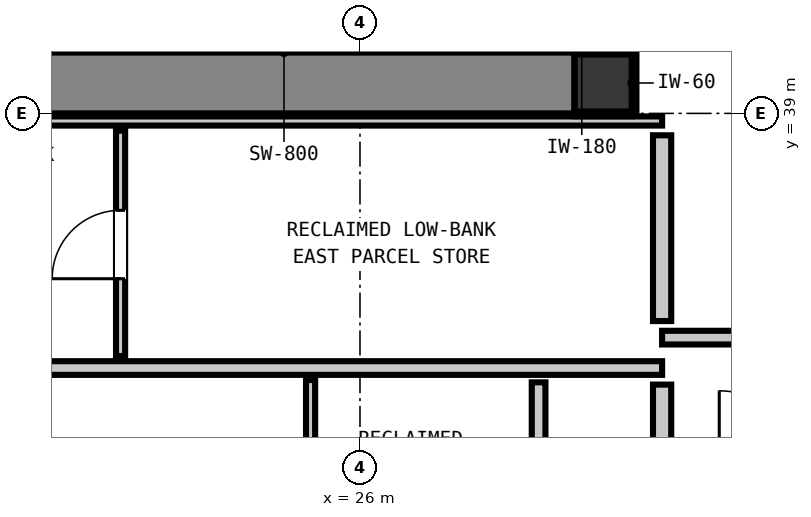
"""IFC4 building model, lengths in metres.
Left out: names, types, materials, properties, quantities, classifications, styles, units other than length and angle.
Written with IfcOpenShell. Run it as: python <this file> out.ifc"""

import sys

from ifc_helpers import new_model, si_unit, direction, frame, frame_2d, origin, origin_2d, place, context, subcontext, project, spatial, rectangle, extrude, element, fill, save


model = new_model("IFC4")
c1 = context("Model", 3, precision=1e-05, world=origin(), true_north=direction((0.0, 1.0)))
c2 = subcontext(c1, "Body", "Model", "MODEL_VIEW")
j1 = project(units=[si_unit("LENGTHUNIT", "METRE"), si_unit("PLANEANGLEUNIT", "RADIAN")], contexts=[c1])
p1 = place(None, origin())
s1 = spatial("IfcSite", under=j1, at=p1, CompositionType="ELEMENT")
p2 = place(p1, origin())
s2 = spatial("IfcBuilding", under=s1, at=p2, CompositionType="ELEMENT")
p3 = place(p2, frame((0.0, 0.0, 268.88)))
s3 = spatial("IfcBuildingStorey", under=s2, at=p3, CompositionType="ELEMENT", Elevation=268.88)
p4 = place(p3, frame((29.2, 39.4, 0.0), z_axis=(0.0, 0.0, 1.0), x_axis=(1.0, 0.0, 0.0)))
e1 = element("IfcColumn", 1, at=p4, inside=s3, PredefinedType="COLUMN", context=c2, shape_type="SweptSolid", body=[
    extrude(rectangle(XDim=0.75, YDim=0.75, at=origin_2d()), origin(), (0.0, 0.0, 1.0), 4.6),
])
p5 = place(p3, frame((21.18, 39.4, 0.0), z_axis=(0.0, 0.0, 1.0), x_axis=(1.0, 0.0, 0.0)))
e2 = element("IfcWall", 2, at=p5, inside=s3, PredefinedType="SHEAR", context=c2, shape_type="SweptSolid", body=[
    extrude(rectangle(XDim=7.64, YDim=0.8, at=frame_2d((3.82, 0.0))), origin(), (0.0, 0.0, 1.0), 4.6),
])
p6 = place(p3, frame((18.95, 35.65, 0.0), z_axis=(0.0, 0.0, 1.0), x_axis=(1.0, 0.0, 0.0)))
e3 = element("IfcWall", 3, at=p6, inside=s3, PredefinedType="PARTITIONING", context=c2, shape_type="SweptSolid", body=[
    extrude(rectangle(XDim=11.025, YDim=0.18, at=frame_2d((5.513, 0.0))), origin(), (0.0, 0.0, 1.0), 4.38),
])
p7 = place(p3, frame((29.975, 36.05, 0.0), z_axis=(0.0, 0.0, 1.0), x_axis=(1.0, 0.0, 0.0)))
e4 = element("IfcWall", 4, at=p7, inside=s3, PredefinedType="PARTITIONING", context=c2, shape_type="SweptSolid", body=[
    extrude(rectangle(XDim=2.505, YDim=0.18, at=frame_2d((1.252, 0.0))), origin(), (0.0, 0.0, 1.0), 4.38),
])
p8 = place(p3, frame((18.95, 38.9, 0.0), z_axis=(0.0, 0.0, 1.0), x_axis=(1.0, 0.0, 0.0)))
e5 = element("IfcWall", 5, at=p8, inside=s3, PredefinedType="PARTITIONING", context=c2, shape_type="SweptSolid", body=[
    extrude(rectangle(XDim=11.025, YDim=0.12, at=frame_2d((5.513, 0.0))), origin(), (0.0, 0.0, 1.0), 4.38),
])
p9 = place(p3, frame((29.975, 34.498, 0.0), z_axis=(0.0, 0.0, 1.0), x_axis=(0.0, 1.0, 0.0)))
e6 = element("IfcWall", 6, at=p9, inside=s3, PredefinedType="PARTITIONING", context=c2, shape_type="SweptSolid", body=[
    extrude(rectangle(XDim=0.934, YDim=0.24, at=frame_2d((0.467, 0.0))), origin(), (0.0, 0.0, 1.0), 4.38),
])
p10 = place(p3, frame((29.975, 36.268, 0.0), z_axis=(0.0, 0.0, 1.0), x_axis=(0.0, 1.0, 0.0)))
e7 = element("IfcWall", 7, at=p10, inside=s3, PredefinedType="PARTITIONING", context=c2, shape_type="SweptSolid", body=[
    extrude(rectangle(XDim=2.444, YDim=0.24, at=frame_2d((1.222, 0.0))), origin(), (0.0, 0.0, 1.0), 4.38),
])
p11 = place(p3, frame((28.35, 31.838, 0.0), z_axis=(0.0, 0.0, 1.0), x_axis=(0.0, 1.0, 0.0)))
e8 = element("IfcWall", 8, at=p11, inside=s3, PredefinedType="PARTITIONING", context=c2, shape_type="SweptSolid", body=[
    extrude(rectangle(XDim=3.624, YDim=0.18, at=frame_2d((1.812, 0.0))), origin(), (0.0, 0.0, 1.0), 4.38),
])
p12 = place(p11, frame((0.541, 0.0, 0.0)))
e9 = element("IfcOpeningElement", 9, at=p12, cuts=e8, PredefinedType="OPENING", context=c2, shape_type="SweptSolid", body=[
    extrude(rectangle(XDim=0.9, YDim=2.1, at=frame_2d((0.45, 1.05))), frame((0.0, 0.1, 0.0), z_axis=(0.0, -1.0, 0.0), x_axis=(1.0, 0.0, 0.0)), (0.0, 0.0, 1.0), 0.2),
])
p13 = place(p3, frame((22.85, 35.808, 0.0), z_axis=(0.0, 0.0, 1.0), x_axis=(0.0, 1.0, 0.0)))
e10 = element("IfcWall", 10, at=p13, inside=s3, PredefinedType="PARTITIONING", context=c2, shape_type="SweptSolid", body=[
    extrude(rectangle(XDim=2.964, YDim=0.12, at=frame_2d((1.482, 0.0))), origin(), (0.0, 0.0, 1.0), 4.38),
])
p14 = place(p13, frame((1.017, 0.0, 0.0)))
e11 = element("IfcOpeningElement", 11, at=p14, cuts=e10, PredefinedType="OPENING", context=c2, shape_type="SweptSolid", body=[
    extrude(rectangle(XDim=0.9, YDim=2.1, at=frame_2d((0.45, 1.05))), frame((0.0, 0.07, 0.0), z_axis=(0.0, -1.0, 0.0), x_axis=(1.0, 0.0, 0.0)), (0.0, 0.0, 1.0), 0.14),
])
p15 = place(p3, frame((25.35, 31.808, 0.0), z_axis=(0.0, 0.0, 1.0), x_axis=(0.0, 1.0, 0.0)))
e12 = element("IfcWall", 12, at=p15, inside=s3, PredefinedType="PARTITIONING", context=c2, shape_type="SweptSolid", body=[
    extrude(rectangle(XDim=3.684, YDim=0.12, at=frame_2d((1.842, 0.0))), origin(), (0.0, 0.0, 1.0), 4.38),
])
for number, where, z_axis, x_axis in (
    (13, (28.833, 38.993, 0.0), (0.0, 0.0, 1.0), (1.0, 0.0, 0.0)),
    (14, (28.833, 39.807, 0.0), (0.0, 0.0, 1.0), (1.0, 0.0, 0.0)),
):
    element("IfcWall", number, at=place(p3, frame(where, z_axis=z_axis, x_axis=x_axis)), inside=s3, PredefinedType="PARTITIONING", context=c2, shape_type="SweptSolid", body=[
        extrude(rectangle(XDim=0.742, YDim=0.06, at=frame_2d((0.371, 0.0))), origin(), (0.0, 0.0, 1.0), 1.45),
    ])
p16 = place(p3, frame((29.607, 39.025, 0.0), z_axis=(0.0, 0.0, 1.0), x_axis=(0.0, 1.0, 0.0)))
e15 = element("IfcWall", 15, at=p16, inside=s3, PredefinedType="PARTITIONING", context=c2, shape_type="SweptSolid", body=[
    extrude(rectangle(XDim=0.75, YDim=0.06, at=frame_2d((0.375, 0.0))), origin(), (0.0, 0.0, 1.0), 1.45),
])
p17 = place(p14, origin())
e16 = element("IfcDoor", 16, at=p17, inside=s3, OperationType="SINGLE_SWING_LEFT", PredefinedType="DOOR", context=c2, shape_type="SweptSolid", body=[
    extrude(rectangle(XDim=0.9, YDim=2.1, at=frame_2d((0.45, 1.05))), frame((0.0, 0.025, 0.0), z_axis=(0.0, -1.0, 0.0), x_axis=(1.0, 0.0, 0.0)), (0.0, 0.0, 1.0), 0.05),
])
fill(e11, e16)
save(model, sys.argv[1])
